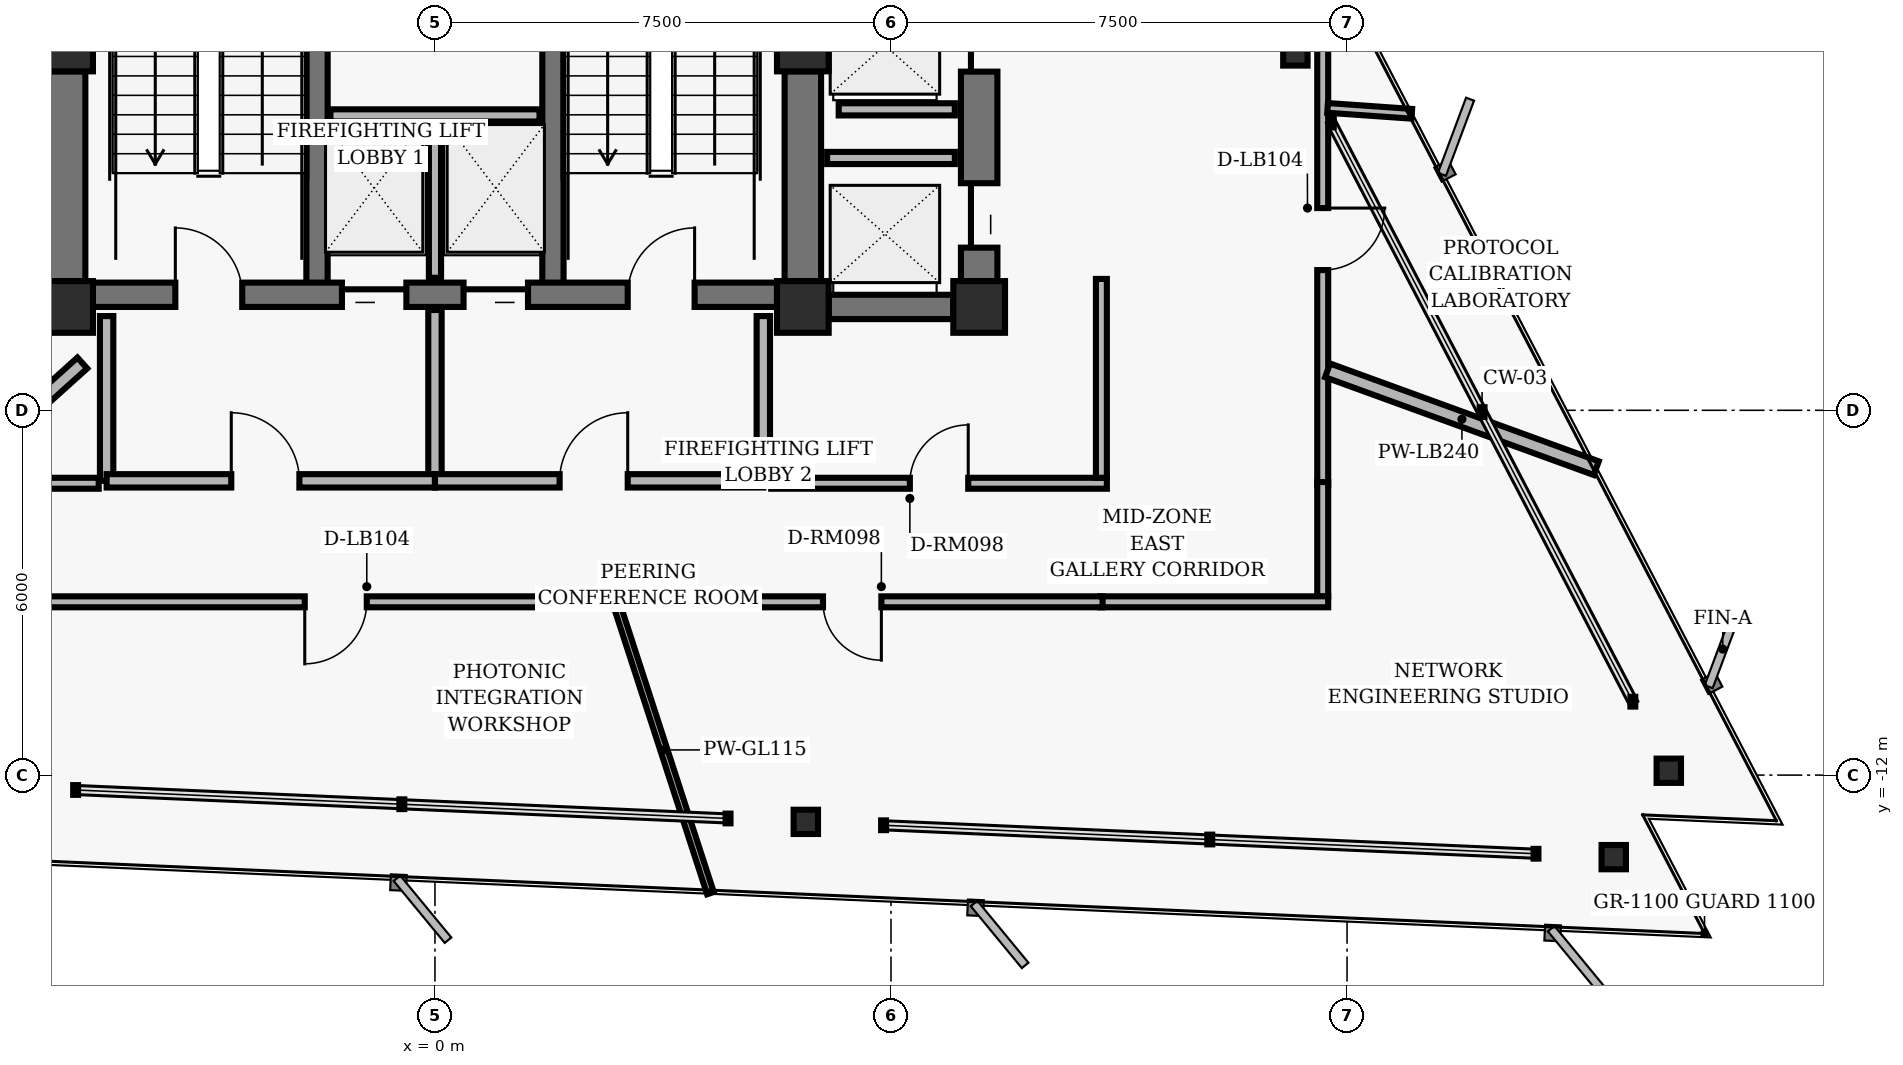
"""IFC4 building model, lengths in metres.
Left out: names, types, materials, properties, quantities, classifications, styles, units other than length and angle.
Written with IfcOpenShell. Run it as: python <this file> out.ifc"""

import sys

from ifc_helpers import new_model, si_unit, direction, frame, frame_2d, origin, origin_2d, place, context, subcontext, project, spatial, rectangle, hollow_rectangle, i_section, extrude, element, fill, save


model = new_model("IFC4")
c1 = context("Model", 3, precision=1e-05, world=origin(), true_north=direction((0.0, 1.0)))
c2 = subcontext(c1, "Body", "Model", "MODEL_VIEW")
j1 = project(units=[si_unit("LENGTHUNIT", "METRE"), si_unit("PLANEANGLEUNIT", "RADIAN")], contexts=[c1])
p1 = place(None, origin())
s1 = spatial("IfcSite", under=j1, at=p1, CompositionType="ELEMENT")
p2 = place(p1, origin())
s2 = spatial("IfcBuilding", under=s1, at=p2, CompositionType="ELEMENT")
p3 = place(p2, frame((0.0, 0.0, 138.08)))
s3 = spatial("IfcBuildingStorey", under=s2, at=p3, CompositionType="ELEMENT", Elevation=138.08)
for number, where, z_axis, x_axis in (
    (1, (-6.05, 0.0, 0.0), (0.0, 0.0, 1.0), (1.0, 0.0, 0.0)),
    (2, (6.05, 0.0, 0.0), (0.0, 0.0, 1.0), (1.0, 0.0, 0.0)),
    (3, (-6.05, -4.3, 0.0), (0.0, 0.0, 1.0), (1.0, 0.0, 0.0)),
    (4, (6.05, -4.3, 0.0), (0.0, 0.0, 1.0), (1.0, 0.0, 0.0)),
    (5, (8.95, -4.3, 0.0), (0.0, 0.0, 1.0), (1.0, 0.0, 0.0)),
):
    element("IfcColumn", number, at=place(p3, frame(where, z_axis=z_axis, x_axis=x_axis)), inside=s3, PredefinedType="COLUMN", context=c2, shape_type="SweptSolid", body=[
        extrude(hollow_rectangle(XDim=0.85, YDim=0.85, WallThickness=0.055, InnerFilletRadius=0.02, OuterFilletRadius=0.04, at=origin_2d()), origin(), (0.0, 0.0, 1.0), 3.04),
    ])
for number, where, z_axis, x_axis in (
    (6, (-6.05, -3.875, 0.0), (0.0, 0.0, 1.0), (0.0, 1.0, 0.0)),
    (7, (6.05, -3.875, 0.0), (0.0, 0.0, 1.0), (0.0, 1.0, 0.0)),
):
    element("IfcWall", number, at=place(p3, frame(where, z_axis=z_axis, x_axis=x_axis)), inside=s3, PredefinedType="SHEAR", context=c2, shape_type="SweptSolid", body=[
        extrude(rectangle(XDim=3.45, YDim=0.6, at=frame_2d((1.725, 0.0))), origin(), (0.0, 0.0, 1.0), 2.788),
    ])
for number, where, z_axis, x_axis in (
    (8, (-1.94, -4.1, 0.0), (0.0, 0.0, 1.0), (0.0, 1.0, 0.0)),
    (9, (1.94, -4.1, 0.0), (0.0, 0.0, 1.0), (0.0, 1.0, 0.0)),
):
    element("IfcWall", number, at=place(p3, frame(where, z_axis=z_axis, x_axis=x_axis)), inside=s3, PredefinedType="SHEAR", context=c2, shape_type="SweptSolid", body=[
        extrude(rectangle(XDim=8.2, YDim=0.35, at=frame_2d((4.1, 0.0))), origin(), (0.0, 0.0, 1.0), 2.788),
    ])
p4 = place(p3, frame((-5.625, -4.1, 0.0), z_axis=(0.0, 0.0, 1.0), x_axis=(1.0, 0.0, 0.0)))
e10 = element("IfcWall", 10, at=p4, inside=s3, PredefinedType="SHEAR", context=c2, shape_type="SweptSolid", body=[
    extrude(rectangle(XDim=11.25, YDim=0.4, at=frame_2d((5.625, 0.0))), origin(), (0.0, 0.0, 1.0), 2.788),
])
p5 = place(p4, frame((1.355, 0.0, 0.0)))
e11 = element("IfcOpeningElement", 11, at=p5, cuts=e10, PredefinedType="OPENING", context=c2, shape_type="SweptSolid", body=[
    extrude(rectangle(XDim=1.1, YDim=2.04, at=frame_2d((0.55, 1.02))), frame((0.0, 0.21, 0.0), z_axis=(0.0, -1.0, 0.0), x_axis=(1.0, 0.0, 0.0)), (0.0, 0.0, 1.0), 0.42),
])
p6 = place(p4, frame((8.795, 0.0, 0.0)))
e12 = element("IfcOpeningElement", 12, at=p6, cuts=e10, PredefinedType="OPENING", context=c2, shape_type="SweptSolid", body=[
    extrude(rectangle(XDim=1.1, YDim=2.04, at=frame_2d((0.55, 1.02))), frame((0.0, 0.21, 0.0), z_axis=(0.0, -1.0, 0.0), x_axis=(1.0, 0.0, 0.0)), (0.0, 0.0, 1.0), 0.42),
])
p7 = place(p4, frame((4.095, 0.0, 0.0)))
e13 = element("IfcOpeningElement", 13, at=p7, cuts=e10, PredefinedType="OPENING", context=c2, shape_type="SweptSolid", body=[
    extrude(rectangle(XDim=1.06, YDim=2.04, at=frame_2d((0.53, 1.02))), frame((0.0, 0.21, 0.0), z_axis=(0.0, -1.0, 0.0), x_axis=(1.0, 0.0, 0.0)), (0.0, 0.0, 1.0), 0.42),
])
p8 = place(p4, frame((6.095, 0.0, 0.0)))
e14 = element("IfcOpeningElement", 14, at=p8, cuts=e10, PredefinedType="OPENING", context=c2, shape_type="SweptSolid", body=[
    extrude(rectangle(XDim=1.06, YDim=2.04, at=frame_2d((0.53, 1.02))), frame((0.0, 0.21, 0.0), z_axis=(0.0, -1.0, 0.0), x_axis=(1.0, 0.0, 0.0)), (0.0, 0.0, 1.0), 0.42),
])
p9 = place(p3, frame((8.95, -3.875, 0.0), z_axis=(0.0, 0.0, 1.0), x_axis=(0.0, 1.0, 0.0)))
e15 = element("IfcWall", 15, at=p9, inside=s3, PredefinedType="SHEAR", context=c2, shape_type="SweptSolid", body=[
    extrude(rectangle(XDim=7.95, YDim=0.6, at=frame_2d((3.975, 0.0))), origin(), (0.0, 0.0, 1.0), 2.788),
])
p10 = place(p9, frame((0.55, 0.0, 0.0)))
e16 = element("IfcOpeningElement", 16, at=p10, cuts=e15, PredefinedType="OPENING", context=c2, shape_type="SweptSolid", body=[
    extrude(rectangle(XDim=1.06, YDim=2.04, at=frame_2d((0.53, 1.02))), frame((0.0, 0.31, 0.0), z_axis=(0.0, -1.0, 0.0), x_axis=(1.0, 0.0, 0.0)), (0.0, 0.0, 1.0), 0.62),
])
p11 = place(p9, frame((3.445, 0.0, 0.0)))
e17 = element("IfcOpeningElement", 17, at=p11, cuts=e15, PredefinedType="OPENING", context=c2, shape_type="SweptSolid", body=[
    extrude(rectangle(XDim=1.06, YDim=2.04, at=frame_2d((0.53, 1.02))), frame((0.0, 0.31, 0.0), z_axis=(0.0, -1.0, 0.0), x_axis=(1.0, 0.0, 0.0)), (0.0, 0.0, 1.0), 0.62),
])
p12 = place(p9, frame((6.33, 0.0, 0.0)))
e18 = element("IfcOpeningElement", 18, at=p12, cuts=e15, PredefinedType="OPENING", context=c2, shape_type="SweptSolid", body=[
    extrude(rectangle(XDim=1.06, YDim=2.04, at=frame_2d((0.53, 1.02))), frame((0.0, 0.31, 0.0), z_axis=(0.0, -1.0, 0.0), x_axis=(1.0, 0.0, 0.0)), (0.0, 0.0, 1.0), 0.62),
])
p13 = place(p3, frame((6.475, -4.3, 0.0), z_axis=(0.0, 0.0, 1.0), x_axis=(1.0, 0.0, 0.0)))
e19 = element("IfcWall", 19, at=p13, inside=s3, PredefinedType="SHEAR", context=c2, shape_type="SweptSolid", body=[
    extrude(rectangle(XDim=2.05, YDim=0.4, at=frame_2d((1.025, 0.0))), origin(), (0.0, 0.0, 1.0), 2.788),
])
for number, where, z_axis, x_axis in (
    (20, (20.292, -11.928, 0.0), (0.0, 0.0, 1.0), (1.0, 0.0, 0.0)),
    (21, (14.15, -0.131, 0.0), (0.0, 0.0, 1.0), (1.0, 0.0, 0.0)),
    (22, (6.099, -12.769, 0.0), (0.0, 0.0, 1.0), (1.0, 0.0, 0.0)),
    (23, (19.386, -13.349, 0.0), (0.0, 0.0, 1.0), (1.0, 0.0, 0.0)),
):
    element("IfcColumn", number, at=place(p3, frame(where, z_axis=z_axis, x_axis=x_axis)), inside=s3, PredefinedType="COLUMN", context=c2, shape_type="SweptSolid", body=[
        extrude(i_section(OverallWidth=0.401, OverallDepth=0.399, WebThickness=0.025, FlangeThickness=0.04, FilletRadius=0.018, at=origin_2d()), origin(), (0.0, 0.0, 1.0), 3.04),
    ])
p14 = place(p3, frame((0.0, -3.82, 0.0), z_axis=(0.0, 0.0, 1.0), x_axis=(0.0, 1.0, 0.0)))
e24 = element("IfcWall", 24, at=p14, inside=s3, PredefinedType="PARTITIONING", context=c2, shape_type="SweptSolid", body=[
    extrude(rectangle(XDim=2.67, YDim=0.2, at=frame_2d((1.335, 0.0))), origin(), (0.0, 0.0, 1.0), 2.763),
])
p15 = place(p3, frame((-1.72, -1.15, 0.0), z_axis=(0.0, 0.0, 1.0), x_axis=(1.0, 0.0, 0.0)))
e25 = element("IfcWall", 25, at=p15, inside=s3, PredefinedType="PARTITIONING", context=c2, shape_type="SweptSolid", body=[
    extrude(rectangle(XDim=3.44, YDim=0.2, at=frame_2d((1.72, 0.0))), origin(), (0.0, 0.0, 1.0), 2.763),
])
for number, where, z_axis, x_axis in (
    (26, (-5.4, -7.16, 0.0), (0.0, 0.0, 1.0), (0.0, 1.0, 0.0)),
    (27, (5.4, -7.16, 0.0), (0.0, 0.0, 1.0), (0.0, 1.0, 0.0)),
):
    element("IfcWall", number, at=place(p3, frame(where, z_axis=z_axis, x_axis=x_axis)), inside=s3, PredefinedType="PARTITIONING", context=c2, shape_type="SweptSolid", body=[
        extrude(rectangle(XDim=2.71, YDim=0.22, at=frame_2d((1.355, 0.0))), origin(), (0.0, 0.0, 1.0), 2.763),
    ])
p16 = place(p3, frame((0.0, -7.16, 0.0), z_axis=(0.0, 0.0, 1.0), x_axis=(0.0, 1.0, 0.0)))
e28 = element("IfcWall", 28, at=p16, inside=s3, PredefinedType="PARTITIONING", context=c2, shape_type="SweptSolid", body=[
    extrude(rectangle(XDim=2.81, YDim=0.22, at=frame_2d((1.405, 0.0))), origin(), (0.0, 0.0, 1.0), 2.763),
])
p17 = place(p3, frame((-5.4, -7.16, 0.0), z_axis=(0.0, 0.0, 1.0), x_axis=(1.0, 0.0, 0.0)))
e29 = element("IfcWall", 29, at=p17, inside=s3, PredefinedType="PARTITIONING", context=c2, shape_type="SweptSolid", body=[
    extrude(rectangle(XDim=5.4, YDim=0.22, at=frame_2d((2.7, 0.0))), origin(), (0.0, 0.0, 1.0), 2.33),
])
p18 = place(p17, frame((2.05, 0.0, 0.0)))
e30 = element("IfcOpeningElement", 30, at=p18, cuts=e29, PredefinedType="OPENING", context=c2, shape_type="SweptSolid", body=[
    extrude(rectangle(XDim=1.12, YDim=2.02, at=frame_2d((0.56, 1.01))), frame((0.0, 0.12, 0.0), z_axis=(0.0, -1.0, 0.0), x_axis=(1.0, 0.0, 0.0)), (0.0, 0.0, 1.0), 0.24),
])
p19 = place(p3, frame((0.0, -7.16, 0.0), z_axis=(0.0, 0.0, 1.0), x_axis=(1.0, 0.0, 0.0)))
e31 = element("IfcWall", 31, at=p19, inside=s3, PredefinedType="PARTITIONING", context=c2, shape_type="SweptSolid", body=[
    extrude(rectangle(XDim=5.4, YDim=0.22, at=frame_2d((2.7, 0.0))), origin(), (0.0, 0.0, 1.0), 2.33),
])
p20 = place(p19, frame((2.05, 0.0, 0.0)))
e32 = element("IfcOpeningElement", 32, at=p20, cuts=e31, PredefinedType="OPENING", context=c2, shape_type="SweptSolid", body=[
    extrude(rectangle(XDim=1.12, YDim=2.02, at=frame_2d((0.56, 1.01))), frame((0.0, 0.12, 0.0), z_axis=(0.0, -1.0, 0.0), x_axis=(1.0, 0.0, 0.0)), (0.0, 0.0, 1.0), 0.24),
])
p21 = place(p3, frame((6.45, -1.85, 0.0), z_axis=(0.0, 0.0, 1.0), x_axis=(1.0, 0.0, 0.0)))
e33 = element("IfcWall", 33, at=p21, inside=s3, PredefinedType="PARTITIONING", context=c2, shape_type="SweptSolid", body=[
    extrude(rectangle(XDim=2.1, YDim=0.2, at=frame_2d((1.05, 0.0))), origin(), (0.0, 0.0, 1.0), 2.763),
])
p22 = place(p3, frame((6.64, -1.05, 0.0), z_axis=(0.0, 0.0, 1.0), x_axis=(1.0, 0.0, 0.0)))
e34 = element("IfcWall", 34, at=p22, inside=s3, PredefinedType="PARTITIONING", context=c2, shape_type="SweptSolid", body=[
    extrude(rectangle(XDim=1.91, YDim=0.2, at=frame_2d((0.955, 0.0))), origin(), (0.0, 0.0, 1.0), 2.763),
])
p23 = place(p3, frame((14.6, 0.26, 0.0), z_axis=(0.0, 0.0, 1.0), x_axis=(0.0, -1.0, 0.0)))
e35 = element("IfcWall", 35, at=p23, inside=s3, PredefinedType="PARTITIONING", context=c2, shape_type="SweptSolid", body=[
    extrude(rectangle(XDim=7.479, YDim=0.18, at=frame_2d((3.74, 0.0))), origin(), (0.0, 0.0, 1.0), 2.763),
])
p24 = place(p23, frame((2.933, 0.0, 0.0)))
e36 = element("IfcOpeningElement", 36, at=p24, cuts=e35, PredefinedType="OPENING", context=c2, shape_type="SweptSolid", body=[
    extrude(rectangle(XDim=1.02, YDim=2.02, at=frame_2d((0.51, 1.01))), frame((0.0, 0.1, 0.0), z_axis=(0.0, -1.0, 0.0), x_axis=(1.0, 0.0, 0.0)), (0.0, 0.0, 1.0), 0.2),
])
p25 = place(p3, frame((14.6, -7.18, 0.0), z_axis=(0.0, 0.0, 1.0), x_axis=(0.0, -1.0, 0.0)))
e37 = element("IfcWall", 37, at=p25, inside=s3, PredefinedType="PARTITIONING", context=c2, shape_type="SweptSolid", body=[
    extrude(rectangle(XDim=1.88, YDim=0.18, at=frame_2d((0.94, 0.0))), origin(), (0.0, 0.0, 1.0), 2.763),
])
p26 = place(p3, frame((14.69, -9.15, 0.0), z_axis=(0.0, 0.0, 1.0), x_axis=(-1.0, 0.0, 0.0)))
e38 = element("IfcWall", 38, at=p26, inside=s3, PredefinedType="PARTITIONING", context=c2, shape_type="SweptSolid", body=[
    extrude(rectangle(XDim=3.75, YDim=0.18, at=frame_2d((1.875, 0.0))), origin(), (0.0, 0.0, 1.0), 2.33),
])
p27 = place(p3, frame((10.98, -9.15, 0.0), z_axis=(0.0, 0.0, 1.0), x_axis=(-1.0, 0.0, 0.0)))
e39 = element("IfcWall", 39, at=p27, inside=s3, PredefinedType="PARTITIONING", context=c2, shape_type="SweptSolid", body=[
    extrude(rectangle(XDim=17.5, YDim=0.18, at=frame_2d((8.75, 0.0))), origin(), (0.0, 0.0, 1.0), 2.33),
])
p28 = place(p27, frame((12.102, 0.0, 0.0)))
e40 = element("IfcOpeningElement", 40, at=p28, cuts=e39, PredefinedType="OPENING", context=c2, shape_type="SweptSolid", body=[
    extrude(rectangle(XDim=1.02, YDim=2.02, at=frame_2d((0.51, 1.01))), frame((0.0, 0.1, 0.0), z_axis=(0.0, -1.0, 0.0), x_axis=(1.0, 0.0, 0.0)), (0.0, 0.0, 1.0), 0.2),
])
p29 = place(p27, frame((3.639, 0.0, 0.0)))
e41 = element("IfcOpeningElement", 41, at=p29, cuts=e39, PredefinedType="OPENING", context=c2, shape_type="SweptSolid", body=[
    extrude(rectangle(XDim=0.96, YDim=2.02, at=frame_2d((0.48, 1.01))), frame((0.0, 0.1, 0.0), z_axis=(0.0, -1.0, 0.0), x_axis=(1.0, 0.0, 0.0)), (0.0, 0.0, 1.0), 0.2),
])
p30 = place(p3, frame((5.53, -7.2, 0.0), z_axis=(0.0, 0.0, 1.0), x_axis=(1.0, 0.0, 0.0)))
e42 = element("IfcWall", 42, at=p30, inside=s3, PredefinedType="PARTITIONING", context=c2, shape_type="SweptSolid", body=[
    extrude(rectangle(XDim=5.52, YDim=0.18, at=frame_2d((2.76, 0.0))), origin(), (0.0, 0.0, 1.0), 2.33),
])
p31 = place(p30, frame((2.28, 0.0, 0.0)))
e43 = element("IfcOpeningElement", 43, at=p31, cuts=e42, PredefinedType="OPENING", context=c2, shape_type="SweptSolid", body=[
    extrude(rectangle(XDim=0.96, YDim=2.02, at=frame_2d((0.48, 1.01))), frame((0.0, 0.1, 0.0), z_axis=(0.0, -1.0, 0.0), x_axis=(1.0, 0.0, 0.0)), (0.0, 0.0, 1.0), 0.2),
])
p32 = place(p3, frame((10.96, -7.11, 0.0), z_axis=(0.0, 0.0, 1.0), x_axis=(0.0, 1.0, 0.0)))
e44 = element("IfcWall", 44, at=p32, inside=s3, PredefinedType="PARTITIONING", context=c2, shape_type="SweptSolid", body=[
    extrude(rectangle(XDim=3.271, YDim=0.18, at=frame_2d((1.635, 0.0))), origin(), (0.0, 0.0, 1.0), 2.763),
])
p33 = place(p3, frame((-6.59, -7.2, 0.0), z_axis=(0.0, 0.0, 1.0), x_axis=(1.0, 0.0, 0.0)))
e45 = element("IfcWall", 45, at=p33, inside=s3, PredefinedType="PARTITIONING", context=c2, shape_type="SweptSolid", body=[
    extrude(rectangle(XDim=1.06, YDim=0.18, at=frame_2d((0.53, 0.0))), origin(), (0.0, 0.0, 1.0), 2.33),
])
p34 = place(p3, frame((-5.8, -5.222, 0.0), z_axis=(0.0, 0.0, 1.0), x_axis=(-0.743163145085, -0.669110259813, 0.0)))
e46 = element("IfcWall", 46, at=p34, inside=s3, PredefinedType="PARTITIONING", context=c2, shape_type="SweptSolid", body=[
    extrude(rectangle(XDim=0.834, YDim=0.24, at=frame_2d((0.417, 0.0))), origin(), (0.0, 0.0, 1.0), 2.763),
])
p35 = place(p3, frame((2.999, -9.23, 0.0), z_axis=(0.0, 0.0, 1.0), x_axis=(0.309019216851, -0.951055794166, 0.0)))
e47 = element("IfcWall", 47, at=p35, inside=s3, PredefinedType="MOVABLE", context=c2, shape_type="SweptSolid", body=[
    extrude(rectangle(XDim=4.954, YDim=0.115, at=frame_2d((2.477, 0.0))), origin(), (0.0, 0.0, 1.0), 2.763),
])
p36 = place(p3, frame((14.68, -5.343, 0.0), z_axis=(0.0, 0.0, 1.0), x_axis=(0.939684231706, -0.342043191253, 0.0)))
e48 = element("IfcWall", 48, at=p36, inside=s3, PredefinedType="PARTITIONING", context=c2, shape_type="SweptSolid", body=[
    extrude(rectangle(XDim=4.702, YDim=0.24, at=frame_2d((2.351, 0.0))), origin(), (0.0, 0.0, 1.0), 2.763),
])
p37 = place(p3, frame((14.68, -1.027, 0.0), z_axis=(0.0, 0.0, 1.0), x_axis=(0.997571691914, -0.06964710684, 0.0)))
e49 = element("IfcWall", 49, at=p37, inside=s3, PredefinedType="PARTITIONING", context=c2, shape_type="SweptSolid", body=[
    extrude(rectangle(XDim=1.388, YDim=0.16, at=frame_2d((0.694, 0.0))), origin(), (0.0, 0.0, 1.0), 2.763),
])
p38 = place(p5, origin())
e50 = element("IfcDoor", 50, at=p38, inside=s3, OperationType="SINGLE_SWING_LEFT", PredefinedType="DOOR", context=c2, shape_type="SweptSolid", body=[
    extrude(rectangle(XDim=1.1, YDim=2.04, at=frame_2d((0.55, 1.02))), frame((0.0, 0.025, 0.0), z_axis=(0.0, -1.0, 0.0), x_axis=(1.0, 0.0, 0.0)), (0.0, 0.0, 1.0), 0.05),
])
fill(e11, e50)
p39 = place(p6, origin())
e51 = element("IfcDoor", 51, at=p39, inside=s3, OperationType="SINGLE_SWING_RIGHT", PredefinedType="DOOR", context=c2, shape_type="SweptSolid", body=[
    extrude(rectangle(XDim=1.1, YDim=2.04, at=frame_2d((0.55, 1.02))), frame((0.0, 0.025, 0.0), z_axis=(0.0, -1.0, 0.0), x_axis=(1.0, 0.0, 0.0)), (0.0, 0.0, 1.0), 0.05),
])
fill(e12, e51)
p40 = place(p7, origin())
e52 = element("IfcDoor", 52, at=p40, inside=s3, OperationType="SLIDING_TO_LEFT", PredefinedType="DOOR", context=c2, shape_type="SweptSolid", body=[
    extrude(rectangle(XDim=1.06, YDim=2.04, at=frame_2d((0.53, 1.02))), frame((0.0, 0.025, 0.0), z_axis=(0.0, -1.0, 0.0), x_axis=(1.0, 0.0, 0.0)), (0.0, 0.0, 1.0), 0.05),
])
fill(e13, e52)
p41 = place(p8, origin())
e53 = element("IfcDoor", 53, at=p41, inside=s3, OperationType="SLIDING_TO_RIGHT", PredefinedType="DOOR", context=c2, shape_type="SweptSolid", body=[
    extrude(rectangle(XDim=1.06, YDim=2.04, at=frame_2d((0.53, 1.02))), frame((0.0, 0.025, 0.0), z_axis=(0.0, -1.0, 0.0), x_axis=(1.0, 0.0, 0.0)), (0.0, 0.0, 1.0), 0.05),
])
fill(e14, e53)
p42 = place(p18, origin())
e54 = element("IfcDoor", 54, at=p42, inside=s3, OperationType="SINGLE_SWING_LEFT", PredefinedType="DOOR", context=c2, shape_type="SweptSolid", body=[
    extrude(rectangle(XDim=1.12, YDim=2.02, at=frame_2d((0.56, 1.01))), frame((0.0, 0.025, 0.0), z_axis=(0.0, -1.0, 0.0), x_axis=(1.0, 0.0, 0.0)), (0.0, 0.0, 1.0), 0.05),
])
fill(e30, e54)
p43 = place(p20, origin())
e55 = element("IfcDoor", 55, at=p43, inside=s3, OperationType="SINGLE_SWING_RIGHT", PredefinedType="DOOR", context=c2, shape_type="SweptSolid", body=[
    extrude(rectangle(XDim=1.12, YDim=2.02, at=frame_2d((0.56, 1.01))), frame((0.0, 0.025, 0.0), z_axis=(0.0, -1.0, 0.0), x_axis=(1.0, 0.0, 0.0)), (0.0, 0.0, 1.0), 0.05),
])
fill(e32, e55)
p44 = place(p10, origin())
e56 = element("IfcDoor", 56, at=p44, inside=s3, OperationType="SLIDING_TO_LEFT", PredefinedType="DOOR", context=c2, shape_type="SweptSolid", body=[
    extrude(rectangle(XDim=1.06, YDim=2.04, at=frame_2d((0.53, 1.02))), frame((0.0, 0.025, 0.0), z_axis=(0.0, -1.0, 0.0), x_axis=(1.0, 0.0, 0.0)), (0.0, 0.0, 1.0), 0.05),
])
fill(e16, e56)
p45 = place(p11, origin())
e57 = element("IfcDoor", 57, at=p45, inside=s3, OperationType="SLIDING_TO_RIGHT", PredefinedType="DOOR", context=c2, shape_type="SweptSolid", body=[
    extrude(rectangle(XDim=1.06, YDim=2.04, at=frame_2d((0.53, 1.02))), frame((0.0, 0.025, 0.0), z_axis=(0.0, -1.0, 0.0), x_axis=(1.0, 0.0, 0.0)), (0.0, 0.0, 1.0), 0.05),
])
fill(e17, e57)
p46 = place(p28, origin())
e58 = element("IfcDoor", 58, at=p46, inside=s3, OperationType="SINGLE_SWING_RIGHT", PredefinedType="DOOR", context=c2, shape_type="SweptSolid", body=[
    extrude(rectangle(XDim=1.02, YDim=2.02, at=frame_2d((0.51, 1.01))), frame((0.0, 0.025, 0.0), z_axis=(0.0, -1.0, 0.0), x_axis=(1.0, 0.0, 0.0)), (0.0, 0.0, 1.0), 0.05),
])
fill(e40, e58)
p47 = place(p29, origin())
e59 = element("IfcDoor", 59, at=p47, inside=s3, OperationType="SINGLE_SWING_LEFT", PredefinedType="DOOR", context=c2, shape_type="SweptSolid", body=[
    extrude(rectangle(XDim=0.96, YDim=2.02, at=frame_2d((0.48, 1.01))), frame((0.0, 0.025, 0.0), z_axis=(0.0, -1.0, 0.0), x_axis=(1.0, 0.0, 0.0)), (0.0, 0.0, 1.0), 0.05),
])
fill(e41, e59)
p48 = place(p31, origin())
e60 = element("IfcDoor", 60, at=p48, inside=s3, OperationType="SINGLE_SWING_RIGHT", PredefinedType="DOOR", context=c2, shape_type="SweptSolid", body=[
    extrude(rectangle(XDim=0.96, YDim=2.02, at=frame_2d((0.48, 1.01))), frame((0.0, 0.025, 0.0), z_axis=(0.0, -1.0, 0.0), x_axis=(1.0, 0.0, 0.0)), (0.0, 0.0, 1.0), 0.05),
])
fill(e43, e60)
p49 = place(p24, origin())
e61 = element("IfcDoor", 61, at=p49, inside=s3, OperationType="SINGLE_SWING_LEFT", PredefinedType="DOOR", context=c2, shape_type="SweptSolid", body=[
    extrude(rectangle(XDim=1.02, YDim=2.02, at=frame_2d((0.51, 1.01))), frame((0.0, 0.025, 0.0), z_axis=(0.0, -1.0, 0.0), x_axis=(1.0, 0.0, 0.0)), (0.0, 0.0, 1.0), 0.05),
])
fill(e36, e61)
save(model, sys.argv[1])
